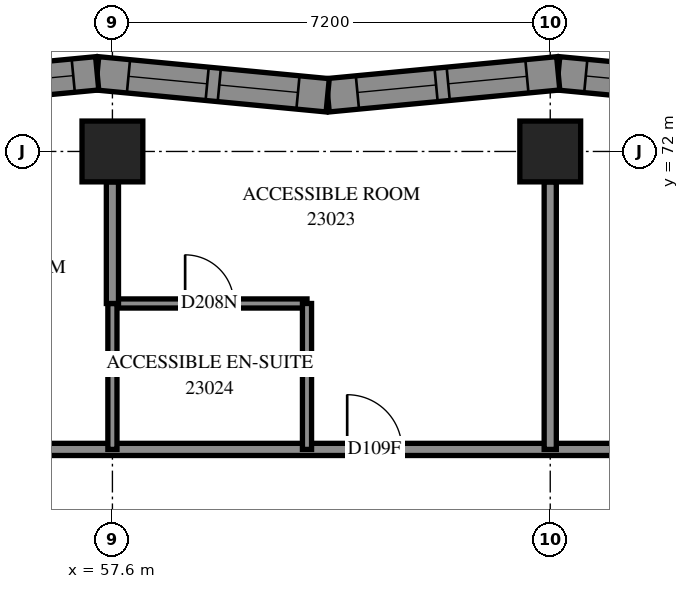
"""IFC4 building model, lengths in metres.
Left out: names, types, materials, properties, quantities, classifications, styles, units other than length and angle.
Written with IfcOpenShell. Run it as: python <this file> out.ifc"""

import sys

from ifc_helpers import new_model, si_unit, direction, frame, frame_2d, origin, origin_2d, place, context, subcontext, project, spatial, polyline, rectangle, outline, extrude, element, fill, save


model = new_model("IFC4")
c1 = context("Model", 3, precision=1e-05, world=origin(), true_north=direction((0.0, 1.0)))
c2 = subcontext(c1, "Body", "Model", "MODEL_VIEW")
j1 = project(units=[si_unit("LENGTHUNIT", "METRE"), si_unit("PLANEANGLEUNIT", "RADIAN")], contexts=[c1])
p1 = place(None, origin())
s1 = spatial("IfcSite", under=j1, at=p1, CompositionType="ELEMENT")
p2 = place(p1, origin())
s2 = spatial("IfcBuilding", under=s1, at=p2, CompositionType="ELEMENT")
p3 = place(p2, frame((0.0, 0.0, 88.0)))
s3 = spatial("IfcBuildingStorey", under=s2, at=p3, CompositionType="ELEMENT", Elevation=88.0)
for number, where, z_axis, x_axis in (
    (1, (57.6, 72.0, 0.0), (0.0, 0.0, 1.0), (1.0, 0.0, 0.0)),
    (2, (64.8, 72.0, 0.0), (0.0, 0.0, 1.0), (1.0, 0.0, 0.0)),
):
    element("IfcColumn", number, at=place(p3, frame(where, z_axis=z_axis, x_axis=x_axis)), inside=s3, PredefinedType="COLUMN", context=c2, shape_type="SweptSolid", body=[
        extrude(rectangle(XDim=1.0, YDim=1.0, at=origin_2d()), origin(), (0.0, 0.0, 1.0), 3.1),
    ])
p4 = place(p3, frame((68.722, 72.924, 0.0), z_axis=(0.0, 0.0, 1.0), x_axis=(-0.9954966527, 0.0947967005, 0.0)))
e3 = element("IfcWall", 3, at=p4, inside=s3, PredefinedType="SOLIDWALL", context=c2, shape_type="SweptSolid", body=[
    extrude(outline(polyline([(0.026, -0.275), (3.834, -0.275), (3.782, 0.275), (-0.026, 0.275), (0.026, -0.275)])), origin(), (0.0, 0.0, 1.0), 3.1),
])
p5 = place(p4, frame((0.553, 0.0, 0.5)))
e4 = element("IfcOpeningElement", 4, at=p5, cuts=e3, PredefinedType="OPENING", context=c2, shape_type="SweptSolid", body=[
    extrude(rectangle(XDim=1.3, YDim=2.45, at=frame_2d((0.65, 1.225))), frame((0.0, 0.285, 0.0), z_axis=(0.0, -1.0, 0.0), x_axis=(1.0, 0.0, 0.0)), (0.0, 0.0, 1.0), 0.57),
])
p6 = place(p4, frame((2.053, 0.0, 0.5)))
e5 = element("IfcOpeningElement", 5, at=p6, cuts=e3, PredefinedType="OPENING", context=c2, shape_type="SweptSolid", body=[
    extrude(rectangle(XDim=1.3, YDim=2.45, at=frame_2d((0.65, 1.225))), frame((0.0, 0.285, 0.0), z_axis=(0.0, -1.0, 0.0), x_axis=(1.0, 0.0, 0.0)), (0.0, 0.0, 1.0), 0.57),
])
p7 = place(p3, frame((64.931, 73.285, 0.0), z_axis=(0.0, 0.0, 1.0), x_axis=(-0.9954966527, -0.0947967005, 0.0)))
e6 = element("IfcWall", 6, at=p7, inside=s3, PredefinedType="SOLIDWALL", context=c2, shape_type="SweptSolid", body=[
    extrude(outline(polyline([(-0.026, -0.275), (3.782, -0.275), (3.834, 0.275), (0.026, 0.275), (-0.026, -0.275)])), origin(), (0.0, 0.0, 1.0), 3.1),
])
p8 = place(p7, frame((0.517, 0.0, 0.5)))
e7 = element("IfcOpeningElement", 7, at=p8, cuts=e6, PredefinedType="OPENING", context=c2, shape_type="SweptSolid", body=[
    extrude(rectangle(XDim=1.3, YDim=2.45, at=frame_2d((0.65, 1.225))), frame((0.0, 0.285, 0.0), z_axis=(0.0, -1.0, 0.0), x_axis=(1.0, 0.0, 0.0)), (0.0, 0.0, 1.0), 0.57),
])
p9 = place(p7, frame((2.017, 0.0, 0.5)))
e8 = element("IfcOpeningElement", 8, at=p9, cuts=e6, PredefinedType="OPENING", context=c2, shape_type="SweptSolid", body=[
    extrude(rectangle(XDim=1.3, YDim=2.45, at=frame_2d((0.65, 1.225))), frame((0.0, 0.285, 0.0), z_axis=(0.0, -1.0, 0.0), x_axis=(1.0, 0.0, 0.0)), (0.0, 0.0, 1.0), 0.57),
])
p10 = place(p3, frame((61.14, 72.924, 0.0), z_axis=(0.0, 0.0, 1.0), x_axis=(-0.9954966527, 0.0947967005, 0.0)))
e9 = element("IfcWall", 9, at=p10, inside=s3, PredefinedType="SOLIDWALL", context=c2, shape_type="SweptSolid", body=[
    extrude(outline(polyline([(0.026, -0.275), (3.834, -0.275), (3.782, 0.275), (-0.026, 0.275), (0.026, -0.275)])), origin(), (0.0, 0.0, 1.0), 3.1),
])
p11 = place(p10, frame((0.491, 0.0, 0.5)))
e10 = element("IfcOpeningElement", 10, at=p11, cuts=e9, PredefinedType="OPENING", context=c2, shape_type="SweptSolid", body=[
    extrude(rectangle(XDim=1.3, YDim=2.45, at=frame_2d((0.65, 1.225))), frame((0.0, 0.285, 0.0), z_axis=(0.0, -1.0, 0.0), x_axis=(1.0, 0.0, 0.0)), (0.0, 0.0, 1.0), 0.57),
])
p12 = place(p10, frame((1.991, 0.0, 0.5)))
e11 = element("IfcOpeningElement", 11, at=p12, cuts=e9, PredefinedType="OPENING", context=c2, shape_type="SweptSolid", body=[
    extrude(rectangle(XDim=1.3, YDim=2.45, at=frame_2d((0.65, 1.225))), frame((0.0, 0.285, 0.0), z_axis=(0.0, -1.0, 0.0), x_axis=(1.0, 0.0, 0.0)), (0.0, 0.0, 1.0), 0.57),
])
p13 = place(p3, frame((57.349, 73.285, 0.0), z_axis=(0.0, 0.0, 1.0), x_axis=(-0.9954966527, -0.0947967005, 0.0)))
e12 = element("IfcWall", 12, at=p13, inside=s3, PredefinedType="SOLIDWALL", context=c2, shape_type="SweptSolid", body=[
    extrude(outline(polyline([(-0.026, -0.275), (3.782, -0.275), (3.834, 0.275), (0.026, 0.275), (-0.026, -0.275)])), origin(), (0.0, 0.0, 1.0), 3.1),
])
p14 = place(p13, frame((0.395, 0.0, 0.5)))
e13 = element("IfcOpeningElement", 13, at=p14, cuts=e12, PredefinedType="OPENING", context=c2, shape_type="SweptSolid", body=[
    extrude(rectangle(XDim=1.3, YDim=2.45, at=frame_2d((0.65, 1.225))), frame((0.0, 0.285, 0.0), z_axis=(0.0, -1.0, 0.0), x_axis=(1.0, 0.0, 0.0)), (0.0, 0.0, 1.0), 0.57),
])
p15 = place(p13, frame((1.895, 0.0, 0.5)))
e14 = element("IfcOpeningElement", 14, at=p15, cuts=e12, PredefinedType="OPENING", context=c2, shape_type="SweptSolid", body=[
    extrude(rectangle(XDim=1.3, YDim=2.45, at=frame_2d((0.65, 1.225))), frame((0.0, 0.285, 0.0), z_axis=(0.0, -1.0, 0.0), x_axis=(1.0, 0.0, 0.0)), (0.0, 0.0, 1.0), 0.57),
])
p16 = place(p3, frame((55.3, 67.1, 0.0), z_axis=(0.0, 0.0, 1.0), x_axis=(1.0, 0.0, 0.0)))
e15 = element("IfcWall", 15, at=p16, inside=s3, PredefinedType="PARTITIONING", context=c2, shape_type="SweptSolid", body=[
    extrude(rectangle(XDim=19.0, YDim=0.2, at=frame_2d((9.5, 0.0))), origin(), (0.0, 0.0, 1.0), 3.1),
])
p17 = place(p16, frame((6.161, 0.0, 0.0)))
e16 = element("IfcOpeningElement", 16, at=p17, cuts=e15, PredefinedType="OPENING", context=c2, shape_type="SweptSolid", body=[
    extrude(rectangle(XDim=0.9, YDim=2.1, at=frame_2d((0.45, 1.05))), frame((0.0, 0.11, 0.0), z_axis=(0.0, -1.0, 0.0), x_axis=(1.0, 0.0, 0.0)), (0.0, 0.0, 1.0), 0.22),
])
p18 = place(p16, frame((13.386, 0.0, 0.0)))
e17 = element("IfcOpeningElement", 17, at=p18, cuts=e15, PredefinedType="OPENING", context=c2, shape_type="SweptSolid", body=[
    extrude(rectangle(XDim=1.0, YDim=2.1, at=frame_2d((0.5, 1.05))), frame((0.0, 0.11, 0.0), z_axis=(0.0, -1.0, 0.0), x_axis=(1.0, 0.0, 0.0)), (0.0, 0.0, 1.0), 0.22),
])
p19 = place(p3, frame((64.8, 67.1, 0.0), z_axis=(0.0, 0.0, 1.0), x_axis=(0.0, 1.0, 0.0)))
e18 = element("IfcWall", 18, at=p19, inside=s3, PredefinedType="PARTITIONING", context=c2, shape_type="SweptSolid", body=[
    extrude(rectangle(XDim=4.4, YDim=0.2, at=frame_2d((2.2, 0.0))), origin(), (0.0, 0.0, 1.0), 3.1),
])
p20 = place(p3, frame((57.6, 69.5, 0.0), z_axis=(0.0, 0.0, 1.0), x_axis=(1.0, 0.0, 0.0)))
e19 = element("IfcWall", 19, at=p20, inside=s3, PredefinedType="PARTITIONING", context=c2, shape_type="SweptSolid", body=[
    extrude(rectangle(XDim=3.2, YDim=0.15, at=frame_2d((1.6, 0.0))), origin(), (0.0, 0.0, 1.0), 3.1),
])
p21 = place(p20, frame((1.196, 0.0, 0.0)))
e20 = element("IfcOpeningElement", 20, at=p21, cuts=e19, PredefinedType="OPENING", context=c2, shape_type="SweptSolid", body=[
    extrude(rectangle(XDim=0.8, YDim=2.1, at=frame_2d((0.4, 1.05))), frame((0.0, 0.085, 0.0), z_axis=(0.0, -1.0, 0.0), x_axis=(1.0, 0.0, 0.0)), (0.0, 0.0, 1.0), 0.17),
])
for number, where, z_axis, x_axis in (
    (21, (57.6, 67.1, 0.0), (0.0, 0.0, 1.0), (0.0, 1.0, 0.0)),
    (22, (60.8, 67.1, 0.0), (0.0, 0.0, 1.0), (0.0, 1.0, 0.0)),
):
    element("IfcWall", number, at=place(p3, frame(where, z_axis=z_axis, x_axis=x_axis)), inside=s3, PredefinedType="PARTITIONING", context=c2, shape_type="SweptSolid", body=[
        extrude(rectangle(XDim=2.4, YDim=0.15, at=frame_2d((1.2, 0.0))), origin(), (0.0, 0.0, 1.0), 3.1),
    ])
p22 = place(p3, frame((57.6, 69.5, 0.0), z_axis=(0.0, 0.0, 1.0), x_axis=(0.0, 1.0, 0.0)))
e23 = element("IfcWall", 23, at=p22, inside=s3, PredefinedType="PARTITIONING", context=c2, shape_type="SweptSolid", body=[
    extrude(rectangle(XDim=2.0, YDim=0.2, at=frame_2d((1.0, 0.0))), origin(), (0.0, 0.0, 1.0), 3.1),
])
p23 = place(p6, origin())
e24 = element("IfcWindow", 24, at=p23, inside=s3, PartitioningType="SINGLE_PANEL", PredefinedType="WINDOW", context=c2, shape_type="SweptSolid", body=[
    extrude(rectangle(XDim=1.3, YDim=2.45, at=frame_2d((0.65, 1.225))), frame((0.0, 0.155, 0.0), z_axis=(0.0, -1.0, 0.0), x_axis=(1.0, 0.0, 0.0)), (0.0, 0.0, 1.0), 0.06),
])
fill(e5, e24)
p24 = place(p8, origin())
e25 = element("IfcWindow", 25, at=p24, inside=s3, PartitioningType="SINGLE_PANEL", PredefinedType="WINDOW", context=c2, shape_type="SweptSolid", body=[
    extrude(rectangle(XDim=1.3, YDim=2.45, at=frame_2d((0.65, 1.225))), frame((0.0, 0.155, 0.0), z_axis=(0.0, -1.0, 0.0), x_axis=(1.0, 0.0, 0.0)), (0.0, 0.0, 1.0), 0.06),
])
fill(e7, e25)
p25 = place(p9, origin())
e26 = element("IfcWindow", 26, at=p25, inside=s3, PartitioningType="SINGLE_PANEL", PredefinedType="WINDOW", context=c2, shape_type="SweptSolid", body=[
    extrude(rectangle(XDim=1.3, YDim=2.45, at=frame_2d((0.65, 1.225))), frame((0.0, 0.155, 0.0), z_axis=(0.0, -1.0, 0.0), x_axis=(1.0, 0.0, 0.0)), (0.0, 0.0, 1.0), 0.06),
])
fill(e8, e26)
p26 = place(p11, origin())
e27 = element("IfcWindow", 27, at=p26, inside=s3, PartitioningType="SINGLE_PANEL", PredefinedType="WINDOW", context=c2, shape_type="SweptSolid", body=[
    extrude(rectangle(XDim=1.3, YDim=2.45, at=frame_2d((0.65, 1.225))), frame((0.0, 0.155, 0.0), z_axis=(0.0, -1.0, 0.0), x_axis=(1.0, 0.0, 0.0)), (0.0, 0.0, 1.0), 0.06),
])
fill(e10, e27)
p27 = place(p12, origin())
e28 = element("IfcWindow", 28, at=p27, inside=s3, PartitioningType="SINGLE_PANEL", PredefinedType="WINDOW", context=c2, shape_type="SweptSolid", body=[
    extrude(rectangle(XDim=1.3, YDim=2.45, at=frame_2d((0.65, 1.225))), frame((0.0, 0.155, 0.0), z_axis=(0.0, -1.0, 0.0), x_axis=(1.0, 0.0, 0.0)), (0.0, 0.0, 1.0), 0.06),
])
fill(e11, e28)
p28 = place(p14, origin())
e29 = element("IfcWindow", 29, at=p28, inside=s3, PartitioningType="SINGLE_PANEL", PredefinedType="WINDOW", context=c2, shape_type="SweptSolid", body=[
    extrude(rectangle(XDim=1.3, YDim=2.45, at=frame_2d((0.65, 1.225))), frame((0.0, 0.155, 0.0), z_axis=(0.0, -1.0, 0.0), x_axis=(1.0, 0.0, 0.0)), (0.0, 0.0, 1.0), 0.06),
])
fill(e13, e29)
p29 = place(p17, origin())
e30 = element("IfcDoor", 30, at=p29, inside=s3, OperationType="SINGLE_SWING_RIGHT", PredefinedType="DOOR", context=c2, shape_type="SweptSolid", body=[
    extrude(rectangle(XDim=0.9, YDim=2.1, at=frame_2d((0.45, 1.05))), frame((0.0, 0.025, 0.0), z_axis=(0.0, -1.0, 0.0), x_axis=(1.0, 0.0, 0.0)), (0.0, 0.0, 1.0), 0.05),
])
fill(e16, e30)
p30 = place(p21, origin())
e31 = element("IfcDoor", 31, at=p30, inside=s3, OperationType="SINGLE_SWING_RIGHT", PredefinedType="DOOR", context=c2, shape_type="SweptSolid", body=[
    extrude(rectangle(XDim=0.8, YDim=2.1, at=frame_2d((0.4, 1.05))), frame((0.0, 0.025, 0.0), z_axis=(0.0, -1.0, 0.0), x_axis=(1.0, 0.0, 0.0)), (0.0, 0.0, 1.0), 0.05),
])
fill(e20, e31)
save(model, sys.argv[1])
